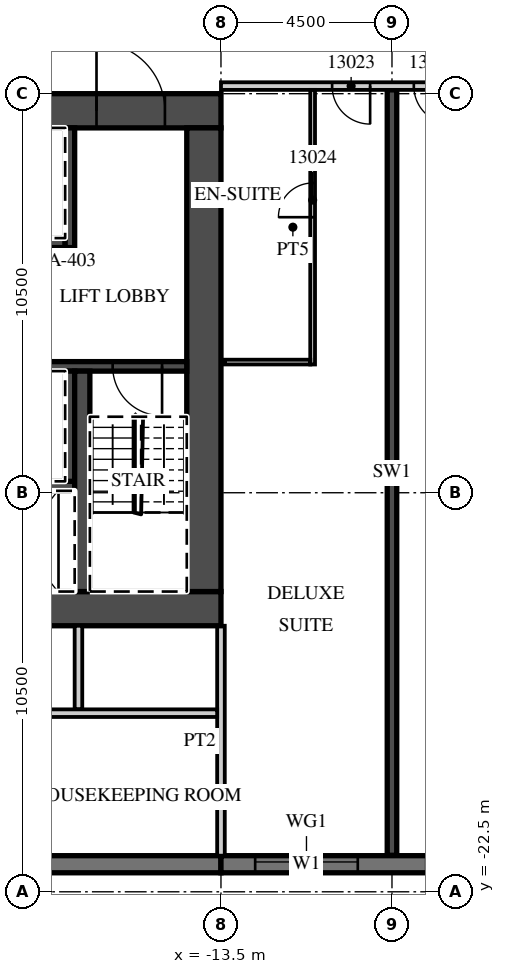
"""IFC4 building model, lengths in metres.
Left out: names, types, materials, properties, quantities, classifications, styles, units other than length and angle.
Written with IfcOpenShell. Run it as: python <this file> out.ifc"""

import sys

from ifc_helpers import new_model, si_unit, direction, frame, frame_2d, origin, place, context, subcontext, project, spatial, rectangle, extrude, element, fill, save


model = new_model("IFC4")
c1 = context("Model", 3, precision=1e-05, world=origin(), true_north=direction((0.0, 1.0)))
c2 = subcontext(c1, "Body", "Model", "MODEL_VIEW")
j1 = project(units=[si_unit("LENGTHUNIT", "METRE"), si_unit("PLANEANGLEUNIT", "RADIAN")], contexts=[c1])
p1 = place(None, origin())
s1 = spatial("IfcSite", under=j1, at=p1, CompositionType="ELEMENT")
p2 = place(p1, origin())
s2 = spatial("IfcBuilding", under=s1, at=p2, CompositionType="ELEMENT")
p3 = place(p2, frame((0.0, 0.0, 73.2)))
s3 = spatial("IfcBuildingStorey", under=s2, at=p3, CompositionType="ELEMENT", Elevation=73.2)
p4 = place(p3, frame((-9.0, -21.54, 0.0), z_axis=(0.0, 0.0, 1.0), x_axis=(0.0, 1.0, 0.0)))
e1 = element("IfcWall", 1, at=p4, inside=s3, PredefinedType="SHEAR", context=c2, shape_type="SweptSolid", body=[
    extrude(rectangle(XDim=20.14, YDim=0.25, at=frame_2d((10.07, 0.0))), origin(), (0.0, 0.0, 1.0), 3.3),
])
p5 = place(p3, frame((-31.5, -21.775, 0.0), z_axis=(0.0, 0.0, 1.0), x_axis=(1.0, 0.0, 0.0)))
e2 = element("IfcWall", 2, at=p5, inside=s3, PredefinedType="SOLIDWALL", context=c2, shape_type="SweptSolid", body=[
    extrude(rectangle(XDim=18.0, YDim=0.45, at=frame_2d((9.0, 0.0))), origin(), (0.0, 0.0, 1.0), 3.02),
])
p6 = place(p3, frame((-13.5, -21.775, 0.0), z_axis=(0.0, 0.0, 1.0), x_axis=(1.0, 0.0, 0.0)))
e3 = element("IfcWall", 3, at=p6, inside=s3, PredefinedType="SOLIDWALL", context=c2, shape_type="SweptSolid", body=[
    extrude(rectangle(XDim=54.5, YDim=0.45, at=frame_2d((27.25, 0.0))), origin(), (0.0, 0.0, 1.0), 3.02),
])
p7 = place(p6, frame((0.9, 0.0, 0.45)))
e4 = element("IfcOpeningElement", 4, at=p7, cuts=e3, PredefinedType="OPENING", context=c2, shape_type="SweptSolid", body=[
    extrude(rectangle(XDim=2.7, YDim=2.25, at=frame_2d((1.35, 1.125))), frame((0.0, 0.235, 0.0), z_axis=(0.0, -1.0, 0.0), x_axis=(1.0, 0.0, 0.0)), (0.0, 0.0, 1.0), 0.47),
])
p8 = place(p6, frame((5.4, 0.0, 0.45)))
e5 = element("IfcOpeningElement", 5, at=p8, cuts=e3, PredefinedType="OPENING", context=c2, shape_type="SweptSolid", body=[
    extrude(rectangle(XDim=2.7, YDim=2.25, at=frame_2d((1.35, 1.125))), frame((0.0, 0.235, 0.0), z_axis=(0.0, -1.0, 0.0), x_axis=(1.0, 0.0, 0.0)), (0.0, 0.0, 1.0), 0.47),
])
p9 = place(p6, frame((9.9, 0.0, 0.45)))
e6 = element("IfcOpeningElement", 6, at=p9, cuts=e3, PredefinedType="OPENING", context=c2, shape_type="SweptSolid", body=[
    extrude(rectangle(XDim=2.7, YDim=2.25, at=frame_2d((1.35, 1.125))), frame((0.0, 0.235, 0.0), z_axis=(0.0, -1.0, 0.0), x_axis=(1.0, 0.0, 0.0)), (0.0, 0.0, 1.0), 0.47),
])
p10 = place(p6, frame((14.4, 0.0, 0.45)))
e7 = element("IfcOpeningElement", 7, at=p10, cuts=e3, PredefinedType="OPENING", context=c2, shape_type="SweptSolid", body=[
    extrude(rectangle(XDim=2.7, YDim=2.25, at=frame_2d((1.35, 1.125))), frame((0.0, 0.235, 0.0), z_axis=(0.0, -1.0, 0.0), x_axis=(1.0, 0.0, 0.0)), (0.0, 0.0, 1.0), 0.47),
])
p11 = place(p6, frame((18.9, 0.0, 0.45)))
e8 = element("IfcOpeningElement", 8, at=p11, cuts=e3, PredefinedType="OPENING", context=c2, shape_type="SweptSolid", body=[
    extrude(rectangle(XDim=2.7, YDim=2.25, at=frame_2d((1.35, 1.125))), frame((0.0, 0.235, 0.0), z_axis=(0.0, -1.0, 0.0), x_axis=(1.0, 0.0, 0.0)), (0.0, 0.0, 1.0), 0.47),
])
p12 = place(p6, frame((23.4, 0.0, 0.45)))
e9 = element("IfcOpeningElement", 9, at=p12, cuts=e3, PredefinedType="OPENING", context=c2, shape_type="SweptSolid", body=[
    extrude(rectangle(XDim=2.7, YDim=2.25, at=frame_2d((1.35, 1.125))), frame((0.0, 0.235, 0.0), z_axis=(0.0, -1.0, 0.0), x_axis=(1.0, 0.0, 0.0)), (0.0, 0.0, 1.0), 0.47),
])
p13 = place(p6, frame((27.9, 0.0, 0.45)))
e10 = element("IfcOpeningElement", 10, at=p13, cuts=e3, PredefinedType="OPENING", context=c2, shape_type="SweptSolid", body=[
    extrude(rectangle(XDim=2.7, YDim=2.25, at=frame_2d((1.35, 1.125))), frame((0.0, 0.235, 0.0), z_axis=(0.0, -1.0, 0.0), x_axis=(1.0, 0.0, 0.0)), (0.0, 0.0, 1.0), 0.47),
])
p14 = place(p6, frame((32.4, 0.0, 0.45)))
e11 = element("IfcOpeningElement", 11, at=p14, cuts=e3, PredefinedType="OPENING", context=c2, shape_type="SweptSolid", body=[
    extrude(rectangle(XDim=2.7, YDim=2.25, at=frame_2d((1.35, 1.125))), frame((0.0, 0.235, 0.0), z_axis=(0.0, -1.0, 0.0), x_axis=(1.0, 0.0, 0.0)), (0.0, 0.0, 1.0), 0.47),
])
p15 = place(p6, frame((36.9, 0.0, 0.45)))
e12 = element("IfcOpeningElement", 12, at=p15, cuts=e3, PredefinedType="OPENING", context=c2, shape_type="SweptSolid", body=[
    extrude(rectangle(XDim=2.7, YDim=2.25, at=frame_2d((1.35, 1.125))), frame((0.0, 0.235, 0.0), z_axis=(0.0, -1.0, 0.0), x_axis=(1.0, 0.0, 0.0)), (0.0, 0.0, 1.0), 0.47),
])
p16 = place(p6, frame((41.4, 0.0, 0.45)))
e13 = element("IfcOpeningElement", 13, at=p16, cuts=e3, PredefinedType="OPENING", context=c2, shape_type="SweptSolid", body=[
    extrude(rectangle(XDim=2.7, YDim=2.25, at=frame_2d((1.35, 1.125))), frame((0.0, 0.235, 0.0), z_axis=(0.0, -1.0, 0.0), x_axis=(1.0, 0.0, 0.0)), (0.0, 0.0, 1.0), 0.47),
])
p17 = place(p6, frame((45.9, 0.0, 0.45)))
e14 = element("IfcOpeningElement", 14, at=p17, cuts=e3, PredefinedType="OPENING", context=c2, shape_type="SweptSolid", body=[
    extrude(rectangle(XDim=2.7, YDim=2.25, at=frame_2d((1.35, 1.125))), frame((0.0, 0.235, 0.0), z_axis=(0.0, -1.0, 0.0), x_axis=(1.0, 0.0, 0.0)), (0.0, 0.0, 1.0), 0.47),
])
p18 = place(p6, frame((50.4, 0.0, 0.45)))
e15 = element("IfcOpeningElement", 15, at=p18, cuts=e3, PredefinedType="OPENING", context=c2, shape_type="SweptSolid", body=[
    extrude(rectangle(XDim=2.7, YDim=2.25, at=frame_2d((1.35, 1.125))), frame((0.0, 0.235, 0.0), z_axis=(0.0, -1.0, 0.0), x_axis=(1.0, 0.0, 0.0)), (0.0, 0.0, 1.0), 0.47),
])
p19 = place(p3, frame((-13.5, -21.55, 0.0), z_axis=(0.0, 0.0, 1.0), x_axis=(0.0, 1.0, 0.0)))
e16 = element("IfcWall", 16, at=p19, inside=s3, PredefinedType="PARTITIONING", context=c2, shape_type="SweptSolid", body=[
    extrude(rectangle(XDim=6.05, YDim=0.2, at=frame_2d((3.025, 0.0))), origin(), (0.0, 0.0, 1.0), 3.02),
])
p20 = place(p3, frame((-13.5, -1.3, 0.0), z_axis=(0.0, 0.0, 1.0), x_axis=(1.0, 0.0, 0.0)))
e17 = element("IfcWall", 17, at=p20, inside=s3, PredefinedType="PARTITIONING", context=c2, shape_type="SweptSolid", body=[
    extrude(rectangle(XDim=58.05, YDim=0.2, at=frame_2d((29.025, 0.0))), origin(), (0.0, 0.0, 1.0), 3.02),
])
p21 = place(p20, frame((2.925, 0.0, 0.0)))
e18 = element("IfcOpeningElement", 18, at=p21, cuts=e17, PredefinedType="OPENING", context=c2, shape_type="SweptSolid", body=[
    extrude(rectangle(XDim=1.0, YDim=2.1, at=frame_2d((0.5, 1.05))), frame((0.0, 0.11, 0.0), z_axis=(0.0, -1.0, 0.0), x_axis=(1.0, 0.0, 0.0)), (0.0, 0.0, 1.0), 0.22),
])
p22 = place(p20, frame((5.075, 0.0, 0.0)))
e19 = element("IfcOpeningElement", 19, at=p22, cuts=e17, PredefinedType="OPENING", context=c2, shape_type="SweptSolid", body=[
    extrude(rectangle(XDim=1.0, YDim=2.1, at=frame_2d((0.5, 1.05))), frame((0.0, 0.11, 0.0), z_axis=(0.0, -1.0, 0.0), x_axis=(1.0, 0.0, 0.0)), (0.0, 0.0, 1.0), 0.22),
])
p23 = place(p20, frame((9.55, 0.0, 0.0)))
e20 = element("IfcOpeningElement", 20, at=p23, cuts=e17, PredefinedType="OPENING", context=c2, shape_type="SweptSolid", body=[
    extrude(rectangle(XDim=1.0, YDim=2.1, at=frame_2d((0.5, 1.05))), frame((0.0, 0.11, 0.0), z_axis=(0.0, -1.0, 0.0), x_axis=(1.0, 0.0, 0.0)), (0.0, 0.0, 1.0), 0.22),
])
p24 = place(p20, frame((18.862, 0.0, 0.0)))
e21 = element("IfcOpeningElement", 21, at=p24, cuts=e17, PredefinedType="OPENING", context=c2, shape_type="SweptSolid", body=[
    extrude(rectangle(XDim=1.2, YDim=2.1, at=frame_2d((0.6, 1.05))), frame((0.0, 0.11, 0.0), z_axis=(0.0, -1.0, 0.0), x_axis=(1.0, 0.0, 0.0)), (0.0, 0.0, 1.0), 0.22),
])
p25 = place(p20, frame((27.862, 0.0, 0.0)))
e22 = element("IfcOpeningElement", 22, at=p25, cuts=e17, PredefinedType="OPENING", context=c2, shape_type="SweptSolid", body=[
    extrude(rectangle(XDim=1.2, YDim=2.1, at=frame_2d((0.6, 1.05))), frame((0.0, 0.11, 0.0), z_axis=(0.0, -1.0, 0.0), x_axis=(1.0, 0.0, 0.0)), (0.0, 0.0, 1.0), 0.22),
])
p26 = place(p20, frame((34.45, 0.0, 0.0)))
e23 = element("IfcOpeningElement", 23, at=p26, cuts=e17, PredefinedType="OPENING", context=c2, shape_type="SweptSolid", body=[
    extrude(rectangle(XDim=1.0, YDim=2.1, at=frame_2d((0.5, 1.05))), frame((0.0, 0.11, 0.0), z_axis=(0.0, -1.0, 0.0), x_axis=(1.0, 0.0, 0.0)), (0.0, 0.0, 1.0), 0.22),
])
p27 = place(p20, frame((38.925, 0.0, 0.0)))
e24 = element("IfcOpeningElement", 24, at=p27, cuts=e17, PredefinedType="OPENING", context=c2, shape_type="SweptSolid", body=[
    extrude(rectangle(XDim=1.0, YDim=2.1, at=frame_2d((0.5, 1.05))), frame((0.0, 0.11, 0.0), z_axis=(0.0, -1.0, 0.0), x_axis=(1.0, 0.0, 0.0)), (0.0, 0.0, 1.0), 0.22),
])
p28 = place(p20, frame((45.862, 0.0, 0.0)))
e25 = element("IfcOpeningElement", 25, at=p28, cuts=e17, PredefinedType="OPENING", context=c2, shape_type="SweptSolid", body=[
    extrude(rectangle(XDim=1.2, YDim=2.1, at=frame_2d((0.6, 1.05))), frame((0.0, 0.11, 0.0), z_axis=(0.0, -1.0, 0.0), x_axis=(1.0, 0.0, 0.0)), (0.0, 0.0, 1.0), 0.22),
])
p29 = place(p20, frame((50.075, 0.0, 0.0)))
e26 = element("IfcOpeningElement", 26, at=p29, cuts=e17, PredefinedType="OPENING", context=c2, shape_type="SweptSolid", body=[
    extrude(rectangle(XDim=1.0, YDim=2.1, at=frame_2d((0.5, 1.05))), frame((0.0, 0.11, 0.0), z_axis=(0.0, -1.0, 0.0), x_axis=(1.0, 0.0, 0.0)), (0.0, 0.0, 1.0), 0.22),
])
p30 = place(p20, frame((56.525, 0.0, 0.0)))
e27 = element("IfcOpeningElement", 27, at=p30, cuts=e17, PredefinedType="OPENING", context=c2, shape_type="SweptSolid", body=[
    extrude(rectangle(XDim=1.0, YDim=2.1, at=frame_2d((0.5, 1.05))), frame((0.0, 0.11, 0.0), z_axis=(0.0, -1.0, 0.0), x_axis=(1.0, 0.0, 0.0)), (0.0, 0.0, 1.0), 0.22),
])
p31 = place(p3, frame((-11.088, -8.625, 0.0), z_axis=(0.0, 0.0, 1.0), x_axis=(0.0, 1.0, 0.0)))
e28 = element("IfcWall", 28, at=p31, inside=s3, PredefinedType="PARTITIONING", context=c2, shape_type="SweptSolid", body=[
    extrude(rectangle(XDim=7.225, YDim=0.125, at=frame_2d((3.613, 0.0))), origin(), (0.0, 0.0, 1.0), 3.02),
])
p32 = place(p31, frame((3.875, 0.0, 0.0)))
e29 = element("IfcOpeningElement", 29, at=p32, cuts=e28, PredefinedType="OPENING", context=c2, shape_type="SweptSolid", body=[
    extrude(rectangle(XDim=0.9, YDim=2.1, at=frame_2d((0.45, 1.05))), frame((0.0, 0.073, 0.0), z_axis=(0.0, -1.0, 0.0), x_axis=(1.0, 0.0, 0.0)), (0.0, 0.0, 1.0), 0.145),
])
p33 = place(p3, frame((-13.4, -8.562, 0.0), z_axis=(0.0, 0.0, 1.0), x_axis=(1.0, 0.0, 0.0)))
e30 = element("IfcWall", 30, at=p33, inside=s3, PredefinedType="PARTITIONING", context=c2, shape_type="SweptSolid", body=[
    extrude(rectangle(XDim=2.25, YDim=0.125, at=frame_2d((1.125, 0.0))), origin(), (0.0, 0.0, 1.0), 3.02),
])
p34 = place(p3, frame((-31.5, -1.95, 0.0), z_axis=(0.0, 0.0, 1.0), x_axis=(1.0, 0.0, 0.0)))
e31 = element("IfcWall", 31, at=p34, inside=s3, PredefinedType="SHEAR", context=c2, shape_type="SweptSolid", body=[
    extrude(rectangle(XDim=18.0, YDim=0.9, at=frame_2d((9.0, 0.0))), origin(), (0.0, 0.0, 1.0), 3.02),
])
p35 = place(p34, frame((14.725, 0.0, 0.0)))
e32 = element("IfcOpeningElement", 32, at=p35, cuts=e31, PredefinedType="OPENING", context=c2, shape_type="SweptSolid", body=[
    extrude(rectangle(XDim=1.8, YDim=2.1, at=frame_2d((0.9, 1.05))), frame((0.0, 0.46, 0.0), z_axis=(0.0, -1.0, 0.0), x_axis=(1.0, 0.0, 0.0)), (0.0, 0.0, 1.0), 0.92),
])
p36 = place(p3, frame((-20.3, -15.05, 0.0), z_axis=(0.0, 0.0, 1.0), x_axis=(1.0, 0.0, 0.0)))
e33 = element("IfcWall", 33, at=p36, inside=s3, PredefinedType="SHEAR", context=c2, shape_type="SweptSolid", body=[
    extrude(rectangle(XDim=6.8, YDim=0.9, at=frame_2d((3.4, 0.0))), origin(), (0.0, 0.0, 1.0), 3.02),
])
p37 = place(p36, frame((0.875, 0.0, 0.0)))
e34 = element("IfcOpeningElement", 34, at=p37, cuts=e33, PredefinedType="OPENING", context=c2, shape_type="SweptSolid", body=[
    extrude(rectangle(XDim=1.2, YDim=2.1, at=frame_2d((0.6, 1.05))), frame((0.0, 0.46, 0.0), z_axis=(0.0, -1.0, 0.0), x_axis=(1.0, 0.0, 0.0)), (0.0, 0.0, 1.0), 0.92),
])
p38 = place(p3, frame((-13.95, -14.6, 0.0), z_axis=(0.0, 0.0, 1.0), x_axis=(0.0, 1.0, 0.0)))
e35 = element("IfcWall", 35, at=p38, inside=s3, PredefinedType="SHEAR", context=c2, shape_type="SweptSolid", body=[
    extrude(rectangle(XDim=12.2, YDim=0.9, at=frame_2d((6.1, 0.0))), origin(), (0.0, 0.0, 1.0), 3.02),
])
p39 = place(p3, frame((-30.6, -5.425, 0.0), z_axis=(0.0, 0.0, 1.0), x_axis=(1.0, 0.0, 0.0)))
e36 = element("IfcWall", 36, at=p39, inside=s3, PredefinedType="SHEAR", context=c2, shape_type="SweptSolid", body=[
    extrude(rectangle(XDim=13.0, YDim=0.25, at=frame_2d((6.5, 0.0))), origin(), (0.0, 0.0, 1.0), 3.02),
])
p40 = place(p3, frame((-17.475, -5.55, 0.0), z_axis=(0.0, 0.0, 1.0), x_axis=(0.0, 1.0, 0.0)))
e37 = element("IfcWall", 37, at=p40, inside=s3, PredefinedType="SHEAR", context=c2, shape_type="SweptSolid", body=[
    extrude(rectangle(XDim=3.15, YDim=0.25, at=frame_2d((1.575, 0.0))), origin(), (0.0, 0.0, 1.0), 3.02),
])
p41 = place(p3, frame((-30.6, -8.675, 0.0), z_axis=(0.0, 0.0, 1.0), x_axis=(1.0, 0.0, 0.0)))
e38 = element("IfcWall", 38, at=p41, inside=s3, PredefinedType="SHEAR", context=c2, shape_type="SweptSolid", body=[
    extrude(rectangle(XDim=16.2, YDim=0.25, at=frame_2d((8.1, 0.0))), origin(), (0.0, 0.0, 1.0), 3.02),
])
p42 = place(p41, frame((0.6, 0.0, 0.0)))
e39 = element("IfcOpeningElement", 39, at=p42, cuts=e38, PredefinedType="OPENING", context=c2, shape_type="SweptSolid", body=[
    extrude(rectangle(XDim=1.2, YDim=2.1, at=frame_2d((0.6, 1.05))), frame((0.0, 0.135, 0.0), z_axis=(0.0, -1.0, 0.0), x_axis=(1.0, 0.0, 0.0)), (0.0, 0.0, 1.0), 0.27),
])
p43 = place(p41, frame((3.25, 0.0, 0.0)))
e40 = element("IfcOpeningElement", 40, at=p43, cuts=e38, PredefinedType="OPENING", context=c2, shape_type="SweptSolid", body=[
    extrude(rectangle(XDim=1.2, YDim=2.1, at=frame_2d((0.6, 1.05))), frame((0.0, 0.135, 0.0), z_axis=(0.0, -1.0, 0.0), x_axis=(1.0, 0.0, 0.0)), (0.0, 0.0, 1.0), 0.27),
])
p44 = place(p41, frame((5.9, 0.0, 0.0)))
e41 = element("IfcOpeningElement", 41, at=p44, cuts=e38, PredefinedType="OPENING", context=c2, shape_type="SweptSolid", body=[
    extrude(rectangle(XDim=1.2, YDim=2.1, at=frame_2d((0.6, 1.05))), frame((0.0, 0.135, 0.0), z_axis=(0.0, -1.0, 0.0), x_axis=(1.0, 0.0, 0.0)), (0.0, 0.0, 1.0), 0.27),
])
p45 = place(p41, frame((14.25, 0.0, 0.0)))
e42 = element("IfcOpeningElement", 42, at=p45, cuts=e38, PredefinedType="OPENING", context=c2, shape_type="SweptSolid", body=[
    extrude(rectangle(XDim=1.3, YDim=2.1, at=frame_2d((0.65, 1.05))), frame((0.0, 0.135, 0.0), z_axis=(0.0, -1.0, 0.0), x_axis=(1.0, 0.0, 0.0)), (0.0, 0.0, 1.0), 0.27),
])
p46 = place(p3, frame((-30.6, -11.825, 0.0), z_axis=(0.0, 0.0, 1.0), x_axis=(1.0, 0.0, 0.0)))
e43 = element("IfcWall", 43, at=p46, inside=s3, PredefinedType="SHEAR", context=c2, shape_type="SweptSolid", body=[
    extrude(rectangle(XDim=13.25, YDim=0.25, at=frame_2d((6.625, 0.0))), origin(), (0.0, 0.0, 1.0), 3.02),
])
p47 = place(p3, frame((-17.475, -11.7, 0.0), z_axis=(0.0, 0.0, 1.0), x_axis=(0.0, 1.0, 0.0)))
e44 = element("IfcWall", 44, at=p47, inside=s3, PredefinedType="SHEAR", context=c2, shape_type="SweptSolid", body=[
    extrude(rectangle(XDim=2.9, YDim=0.25, at=frame_2d((1.45, 0.0))), origin(), (0.0, 0.0, 1.0), 3.02),
])
p48 = place(p3, frame((-17.15, -14.6, 0.0), z_axis=(0.0, 0.0, 1.0), x_axis=(0.0, 1.0, 0.0)))
e45 = element("IfcWall", 45, at=p48, inside=s3, PredefinedType="SHEAR", context=c2, shape_type="SweptSolid", body=[
    extrude(rectangle(XDim=5.8, YDim=0.4, at=frame_2d((2.9, 0.0))), origin(), (0.0, 0.0, 1.0), 3.02),
])
p49 = place(p3, frame((-17.25, -17.7, 0.0), z_axis=(0.0, 0.0, 1.0), x_axis=(0.0, 1.0, 0.0)))
e46 = element("IfcWall", 46, at=p49, inside=s3, PredefinedType="PARTITIONING", context=c2, shape_type="SweptSolid", body=[
    extrude(rectangle(XDim=2.2, YDim=0.2, at=frame_2d((1.1, 0.0))), origin(), (0.0, 0.0, 1.0), 3.02),
])
p50 = place(p3, frame((-44.55, -17.8, 0.0), z_axis=(0.0, 0.0, 1.0), x_axis=(1.0, 0.0, 0.0)))
e47 = element("IfcWall", 47, at=p50, inside=s3, PredefinedType="PARTITIONING", context=c2, shape_type="SweptSolid", body=[
    extrude(rectangle(XDim=30.95, YDim=0.2, at=frame_2d((15.475, 0.0))), origin(), (0.0, 0.0, 1.0), 3.02),
])
p51 = place(p50, frame((12.238, 0.0, 0.0)))
e48 = element("IfcOpeningElement", 48, at=p51, cuts=e47, PredefinedType="OPENING", context=c2, shape_type="SweptSolid", body=[
    extrude(rectangle(XDim=0.9, YDim=2.1, at=frame_2d((0.45, 1.05))), frame((0.0, 0.11, 0.0), z_axis=(0.0, -1.0, 0.0), x_axis=(1.0, 0.0, 0.0)), (0.0, 0.0, 1.0), 0.22),
])
p52 = place(p50, frame((20.538, 0.0, 0.0)))
e49 = element("IfcOpeningElement", 49, at=p52, cuts=e47, PredefinedType="OPENING", context=c2, shape_type="SweptSolid", body=[
    extrude(rectangle(XDim=0.9, YDim=2.1, at=frame_2d((0.45, 1.05))), frame((0.0, 0.11, 0.0), z_axis=(0.0, -1.0, 0.0), x_axis=(1.0, 0.0, 0.0)), (0.0, 0.0, 1.0), 0.22),
])
p53 = place(p7, origin())
e50 = element("IfcWindow", 50, at=p53, inside=s3, PartitioningType="SINGLE_PANEL", PredefinedType="WINDOW", context=c2, shape_type="SweptSolid", body=[
    extrude(rectangle(XDim=2.7, YDim=2.25, at=frame_2d((1.35, 1.125))), frame((0.0, 0.09, 0.0), z_axis=(0.0, -1.0, 0.0), x_axis=(1.0, 0.0, 0.0)), (0.0, 0.0, 1.0), 0.06),
])
fill(e4, e50)
p54 = place(p21, origin())
e51 = element("IfcDoor", 51, at=p54, inside=s3, OperationType="SINGLE_SWING_RIGHT", PredefinedType="DOOR", context=c2, shape_type="SweptSolid", body=[
    extrude(rectangle(XDim=1.0, YDim=2.1, at=frame_2d((0.5, 1.05))), frame((0.0, 0.025, 0.0), z_axis=(0.0, -1.0, 0.0), x_axis=(1.0, 0.0, 0.0)), (0.0, 0.0, 1.0), 0.05),
])
fill(e18, e51)
p55 = place(p32, origin())
e52 = element("IfcDoor", 52, at=p55, inside=s3, OperationType="SINGLE_SWING_LEFT", PredefinedType="DOOR", context=c2, shape_type="SweptSolid", body=[
    extrude(rectangle(XDim=0.9, YDim=2.1, at=frame_2d((0.45, 1.05))), frame((0.0, 0.025, 0.0), z_axis=(0.0, -1.0, 0.0), x_axis=(1.0, 0.0, 0.0)), (0.0, 0.0, 1.0), 0.05),
])
fill(e29, e52)
p56 = place(p22, origin())
e53 = element("IfcDoor", 53, at=p56, inside=s3, OperationType="SINGLE_SWING_RIGHT", PredefinedType="DOOR", context=c2, shape_type="SweptSolid", body=[
    extrude(rectangle(XDim=1.0, YDim=2.1, at=frame_2d((0.5, 1.05))), frame((0.0, 0.025, 0.0), z_axis=(0.0, -1.0, 0.0), x_axis=(1.0, 0.0, 0.0)), (0.0, 0.0, 1.0), 0.05),
])
fill(e19, e53)
p57 = place(p35, origin())
e54 = element("IfcDoor", 54, at=p57, inside=s3, OperationType="DOUBLE_DOOR_DOUBLE_SWING", PredefinedType="DOOR", context=c2, shape_type="SweptSolid", body=[
    extrude(rectangle(XDim=1.8, YDim=2.1, at=frame_2d((0.9, 1.05))), frame((0.0, 0.025, 0.0), z_axis=(0.0, -1.0, 0.0), x_axis=(1.0, 0.0, 0.0)), (0.0, 0.0, 1.0), 0.05),
])
fill(e32, e54)
p58 = place(p45, origin())
e55 = element("IfcDoor", 55, at=p58, inside=s3, OperationType="SINGLE_SWING_RIGHT", PredefinedType="DOOR", context=c2, shape_type="SweptSolid", body=[
    extrude(rectangle(XDim=1.3, YDim=2.1, at=frame_2d((0.65, 1.05))), frame((0.0, 0.025, 0.0), z_axis=(0.0, -1.0, 0.0), x_axis=(1.0, 0.0, 0.0)), (0.0, 0.0, 1.0), 0.05),
])
fill(e42, e55)
save(model, sys.argv[1])
